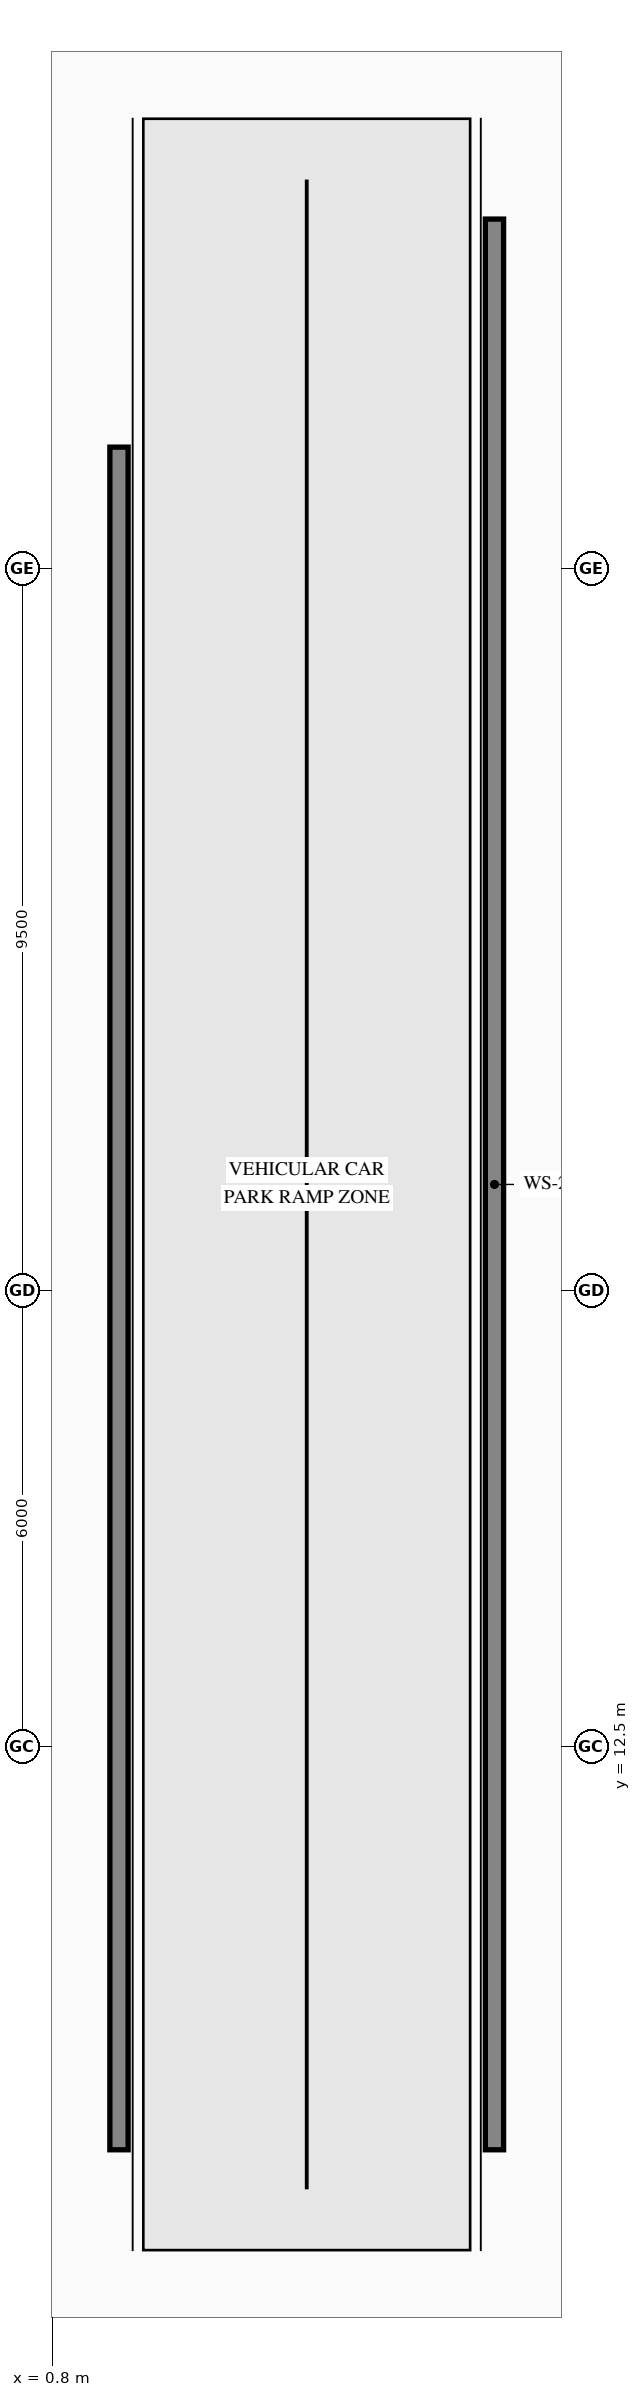
"""IFC4 building model, lengths in metres.
Left out: names, types, materials, properties, quantities, classifications, styles, units other than length and angle.
Written with IfcOpenShell. Run it as: python <this file> out.ifc"""

import sys

from ifc_helpers import new_model, si_unit, direction, frame, frame_2d, origin, place, context, subcontext, project, spatial, rectangle, extrude, element, save


model = new_model("IFC4")
c1 = context("Model", 3, precision=1e-05, world=origin(), true_north=direction((0.0, 1.0)))
c2 = subcontext(c1, "Body", "Model", "MODEL_VIEW")
j1 = project(units=[si_unit("LENGTHUNIT", "METRE"), si_unit("PLANEANGLEUNIT", "RADIAN")], contexts=[c1])
p1 = place(None, origin())
s1 = spatial("IfcSite", under=j1, at=p1, CompositionType="ELEMENT")
p2 = place(p1, origin())
s2 = spatial("IfcBuilding", under=s1, at=p2, CompositionType="ELEMENT")
p3 = place(p2, frame((0.0, 0.0, -13.8)))
s3 = spatial("IfcBuildingStorey", under=s2, at=p3, CompositionType="ELEMENT", Elevation=-13.8)
p4 = place(p3, frame((1.68, 7.2, -0.5), z_axis=(0.0, 0.0, 1.0), x_axis=(0.0, 1.0, 0.0)))
e1 = element("IfcWall", 1, at=p4, inside=s3, PredefinedType="SOLIDWALL", context=c2, shape_type="SweptSolid", body=[
    extrude(rectangle(XDim=22.4, YDim=0.24, at=frame_2d((11.2, 0.0))), origin(), (0.0, 0.0, 1.0), 5.1),
])
p5 = place(p3, frame((6.62, 7.2, -0.5), z_axis=(0.0, 0.0, 1.0), x_axis=(0.0, 1.0, 0.0)))
e2 = element("IfcWall", 2, at=p5, inside=s3, PredefinedType="SOLIDWALL", context=c2, shape_type="SweptSolid", body=[
    extrude(rectangle(XDim=25.4, YDim=0.24, at=frame_2d((12.7, 0.0))), origin(), (0.0, 0.0, 1.0), 5.1),
])
save(model, sys.argv[1])
